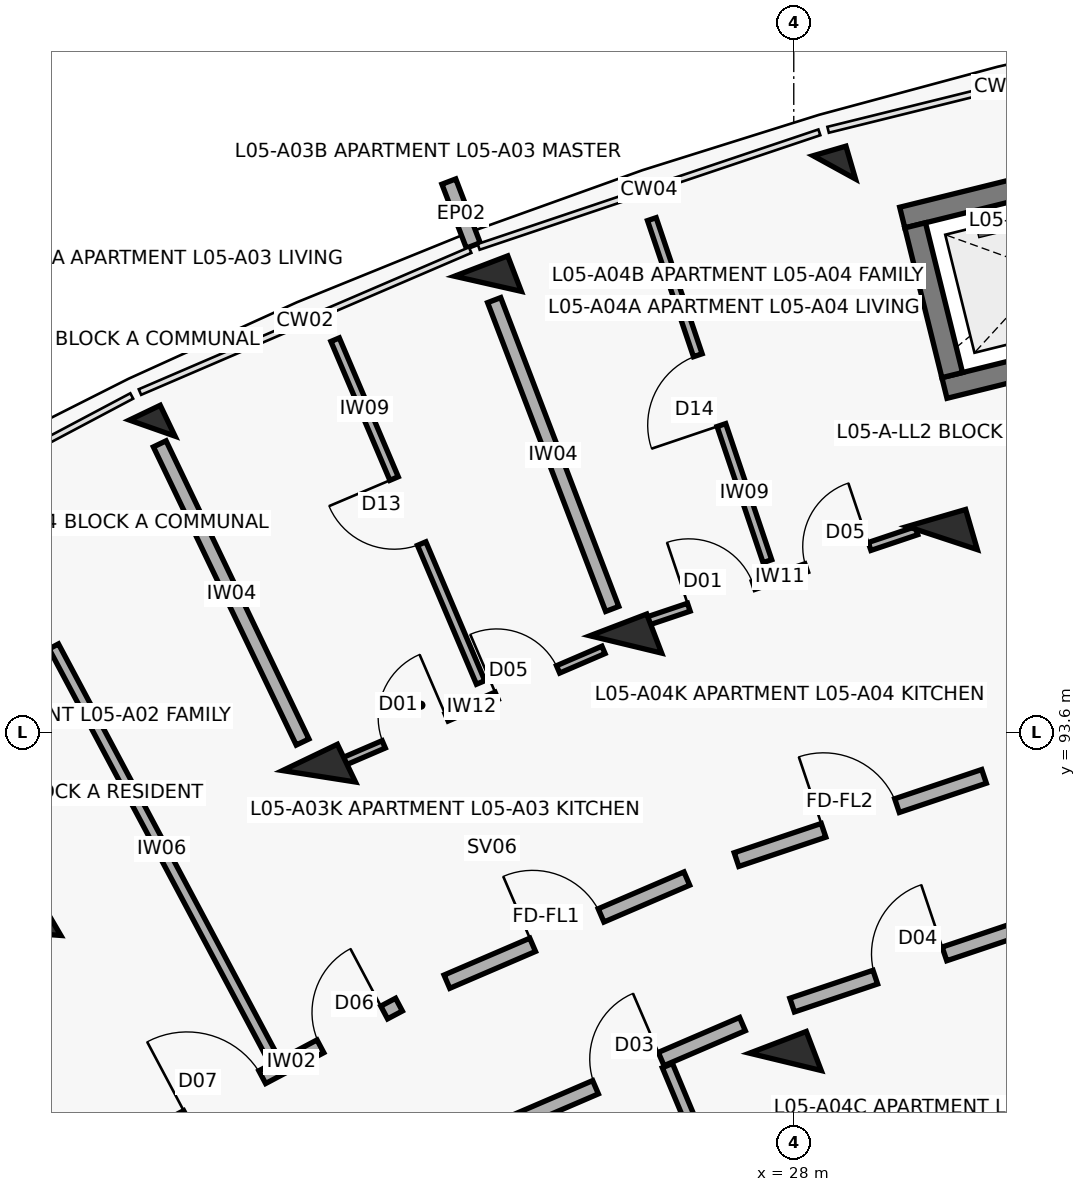
"""IFC4 building model, lengths in metres.
Left out: names, types, materials, properties, quantities, classifications, styles, units other than length and angle.
Written with IfcOpenShell. Run it as: python <this file> out.ifc"""

import sys

from ifc_helpers import new_model, si_unit, direction, frame, frame_2d, origin, origin_2d, place, context, subcontext, project, spatial, rectangle, extrude, element, fill, save


model = new_model("IFC4")
c1 = context("Model", 3, precision=1e-05, world=origin(), true_north=direction((0.0, 1.0)))
c2 = subcontext(c1, "Body", "Model", "MODEL_VIEW")
j1 = project(units=[si_unit("LENGTHUNIT", "METRE"), si_unit("PLANEANGLEUNIT", "RADIAN")], contexts=[c1])
p1 = place(None, origin())
s1 = spatial("IfcSite", under=j1, at=p1, CompositionType="ELEMENT")
p2 = place(p1, origin())
s2 = spatial("IfcBuilding", under=s1, at=p2, CompositionType="ELEMENT")
p3 = place(p2, frame((0.0, 0.0, 17.4)))
s3 = spatial("IfcBuildingStorey", under=s2, at=p3, CompositionType="ELEMENT", Elevation=17.4)
for number, where, z_axis, x_axis in (
    (1, (17.873, 90.96, 0.0), (0.0, 0.0, 1.0), (-0.504, 0.864, 0.0)),
    (2, (21.754, 93.019, 0.0), (0.0, 0.0, 1.0), (-0.432, 0.902, 0.0)),
):
    element("IfcColumn", number, at=place(p3, frame(where, z_axis=z_axis, x_axis=x_axis)), inside=s3, PredefinedType="COLUMN", context=c2, shape_type="SweptSolid", body=[
        extrude(rectangle(XDim=0.55, YDim=0.8, at=origin_2d()), origin(), (0.0, 0.0, 1.0), 3.1),
    ])
p4 = place(p3, frame((19.559, 97.6, 0.0), z_axis=(0.0, 0.0, 1.0), x_axis=(-0.432085748802, 0.901832526405, 0.0)))
e3 = element("IfcColumn", 3, at=p4, inside=s3, PredefinedType="COLUMN", context=c2, shape_type="SweptSolid", body=[
    extrude(rectangle(XDim=0.45, YDim=0.45, at=origin_2d()), origin(), (0.0, 0.0, 1.0), 3.1),
])
for number, where, z_axis, x_axis in (
    (4, (27.889, 89.261, 0.0), (0.0, 0.0, 1.0), (-0.357, 0.934, 0.0)),
    (5, (25.79, 94.753, 0.0), (0.0, 0.0, 1.0), (-0.357, 0.934, 0.0)),
):
    element("IfcColumn", number, at=place(p3, frame(where, z_axis=z_axis, x_axis=x_axis)), inside=s3, PredefinedType="COLUMN", context=c2, shape_type="SweptSolid", body=[
        extrude(rectangle(XDim=0.55, YDim=0.8, at=origin_2d()), origin(), (0.0, 0.0, 1.0), 3.1),
    ])
p5 = place(p3, frame((23.976, 99.499, 0.0), z_axis=(0.0, 0.0, 1.0), x_axis=(-0.357064076459, 0.934079892355, 0.0)))
e6 = element("IfcColumn", 6, at=p5, inside=s3, PredefinedType="COLUMN", context=c2, shape_type="SweptSolid", body=[
    extrude(rectangle(XDim=0.5, YDim=0.75, at=origin_2d()), origin(), (0.0, 0.0, 1.0), 3.1),
])
p6 = place(p3, frame((29.954, 96.153, 0.0), z_axis=(0.0, 0.0, 1.0), x_axis=(-0.27966144946, 0.96009867914, 0.0)))
e7 = element("IfcColumn", 7, at=p6, inside=s3, PredefinedType="COLUMN", context=c2, shape_type="SweptSolid", body=[
    extrude(rectangle(XDim=0.55, YDim=0.8, at=origin_2d()), origin(), (0.0, 0.0, 1.0), 3.1),
])
p7 = place(p3, frame((28.533, 101.031, 0.0), z_axis=(0.0, 0.0, 1.0), x_axis=(-0.27966144946, 0.96009867914, 0.0)))
e8 = element("IfcColumn", 8, at=p7, inside=s3, PredefinedType="COLUMN", context=c2, shape_type="SweptSolid", body=[
    extrude(rectangle(XDim=0.45, YDim=0.45, at=origin_2d()), origin(), (0.0, 0.0, 1.0), 3.1),
])
p8 = place(p3, frame((23.783, 100.003, 0.0), z_axis=(0.0, 0.0, 1.0), x_axis=(-0.356942580168, 0.934126326823, 0.0)))
e9 = element("IfcWall", 9, at=p8, inside=s3, PredefinedType="PARAPET", context=c2, shape_type="SweptSolid", body=[
    extrude(rectangle(XDim=0.9, YDim=0.195, at=frame_2d((0.45, 0.0))), origin(), (0.0, 0.0, 1.0), 2.25),
])
p9 = place(p3, frame((33.273, 98.942, 0.0), z_axis=(0.0, 0.0, 1.0), x_axis=(-0.970707542441, -0.240264160972, 0.0)))
e10 = element("IfcWall", 10, at=p9, inside=s3, PredefinedType="SHEAR", context=c2, shape_type="SweptSolid", body=[
    extrude(rectangle(XDim=3.39, YDim=0.28, at=frame_2d((1.695, 0.0))), origin(), (0.0, 0.0, 1.0), 3.1),
])
p10 = place(p9, frame((1.095, 0.0, 0.0)))
e11 = element("IfcOpeningElement", 11, at=p10, cuts=e10, PredefinedType="OPENING", context=c2, shape_type="SweptSolid", body=[
    extrude(rectangle(XDim=1.2, YDim=2.15, at=frame_2d((0.6, 1.075))), frame((0.0, 0.15, 0.0), z_axis=(0.0, -1.0, 0.0), x_axis=(1.0, 0.0, 0.0)), (0.0, 0.0, 1.0), 0.3),
])
p11 = place(p3, frame((32.718, 101.185, 0.0), z_axis=(0.0, 0.0, 1.0), x_axis=(-0.970711699588, -0.240247364777, 0.0)))
e12 = element("IfcWall", 12, at=p11, inside=s3, PredefinedType="SHEAR", context=c2, shape_type="SweptSolid", body=[
    extrude(rectangle(XDim=3.39, YDim=0.28, at=frame_2d((1.695, 0.0))), origin(), (0.0, 0.0, 1.0), 3.1),
])
p12 = place(p3, frame((30.085, 98.297, 0.0), z_axis=(0.0, 0.0, 1.0), x_axis=(-0.2402993748, 0.970698825832, 0.0)))
e13 = element("IfcWall", 13, at=p12, inside=s3, PredefinedType="SHEAR", context=c2, shape_type="SweptSolid", body=[
    extrude(rectangle(XDim=2.03, YDim=0.28, at=frame_2d((1.015, 0.0))), origin(), (0.0, 0.0, 1.0), 3.1),
])
p13 = place(p3, frame((19.77, 88.404, 0.0), z_axis=(0.0, 0.0, 1.0), x_axis=(0.883410853063, 0.468599258099, 0.0)))
e14 = element("IfcWall", 14, at=p13, inside=s3, PredefinedType="SOLIDWALL", context=c2, shape_type="SweptSolid", body=[
    extrude(rectangle(XDim=3.436, YDim=0.19, at=frame_2d((1.718, 0.0))), origin(), (0.0, 0.0, 1.0), 2.08),
])
p14 = place(p13, frame((0.28, 0.0, 0.0)))
e15 = element("IfcOpeningElement", 15, at=p14, cuts=e14, PredefinedType="OPENING", context=c2, shape_type="SweptSolid", body=[
    extrude(rectangle(XDim=1.12, YDim=2.15, at=frame_2d((0.56, 1.075))), frame((0.0, 0.105, 0.0), z_axis=(0.0, -1.0, 0.0), x_axis=(1.0, 0.0, 0.0)), (0.0, 0.0, 1.0), 0.21),
])
p15 = place(p13, frame((2.266, 0.0, 0.0)))
e16 = element("IfcOpeningElement", 16, at=p15, cuts=e14, PredefinedType="OPENING", context=c2, shape_type="SweptSolid", body=[
    extrude(rectangle(XDim=0.95, YDim=2.1, at=frame_2d((0.475, 1.05))), frame((0.0, 0.105, 0.0), z_axis=(0.0, -1.0, 0.0), x_axis=(1.0, 0.0, 0.0)), (0.0, 0.0, 1.0), 0.21),
])
p16 = place(p3, frame((21.107, 89.387, 0.0), z_axis=(0.0, 0.0, 1.0), x_axis=(-0.469891538074, 0.882724159886, 0.0)))
e17 = element("IfcWall", 17, at=p16, inside=s3, PredefinedType="PARTITIONING", context=c2, shape_type="SweptSolid", body=[
    extrude(rectangle(XDim=7.95, YDim=0.14, at=frame_2d((3.975, 0.0))), origin(), (0.0, 0.0, 1.0), 2.08),
])
p17 = place(p16, frame((6.05, 0.0, 0.0)))
e18 = element("IfcOpeningElement", 18, at=p17, cuts=e17, PredefinedType="OPENING", context=c2, shape_type="SweptSolid", body=[
    extrude(rectangle(XDim=0.92, YDim=2.1, at=frame_2d((0.46, 1.05))), frame((0.0, 0.08, 0.0), z_axis=(0.0, -1.0, 0.0), x_axis=(1.0, 0.0, 0.0)), (0.0, 0.0, 1.0), 0.16),
])
p18 = place(p3, frame((23.437, 90.316, 0.0), z_axis=(0.0, 0.0, 1.0), x_axis=(0.918718172399, 0.394913813008, 0.0)))
e19 = element("IfcWall", 19, at=p18, inside=s3, PredefinedType="SOLIDWALL", context=c2, shape_type="SweptSolid", body=[
    extrude(rectangle(XDim=3.436, YDim=0.19, at=frame_2d((1.718, 0.0))), origin(), (0.0, 0.0, 1.0), 2.08),
])
p19 = place(p18, frame((1.228, 0.0, 0.0)))
e20 = element("IfcOpeningElement", 20, at=p19, cuts=e19, PredefinedType="OPENING", context=c2, shape_type="SweptSolid", body=[
    extrude(rectangle(XDim=0.98, YDim=2.15, at=frame_2d((0.49, 1.075))), frame((0.0, 0.105, 0.0), z_axis=(0.0, -1.0, 0.0), x_axis=(1.0, 0.0, 0.0)), (0.0, 0.0, 1.0), 0.21),
])
p20 = place(p3, frame((24.322, 88.467, 0.0), z_axis=(0.0, 0.0, 1.0), x_axis=(0.918723391052, 0.394901672235, 0.0)))
e21 = element("IfcWall", 21, at=p20, inside=s3, PredefinedType="SOLIDWALL", context=c2, shape_type="SweptSolid", body=[
    extrude(rectangle(XDim=3.269, YDim=0.19, at=frame_2d((1.634, 0.0))), origin(), (0.0, 0.0, 1.0), 2.08),
])
p21 = place(p20, frame((1.164, 0.0, 0.0)))
e22 = element("IfcOpeningElement", 22, at=p21, cuts=e21, PredefinedType="OPENING", context=c2, shape_type="SweptSolid", body=[
    extrude(rectangle(XDim=0.94, YDim=2.1, at=frame_2d((0.47, 1.05))), frame((0.0, 0.105, 0.0), z_axis=(0.0, -1.0, 0.0), x_axis=(1.0, 0.0, 0.0)), (0.0, 0.0, 1.0), 0.21),
])
p22 = place(p3, frame((27.609, 86.166, 0.0), z_axis=(0.0, 0.0, 1.0), x_axis=(-0.385151143297, 0.922853507777, 0.0)))
e23 = element("IfcWall", 23, at=p22, inside=s3, PredefinedType="PARTITIONING", context=c2, shape_type="SweptSolid", body=[
    extrude(rectangle(XDim=3.3, YDim=0.145, at=frame_2d((1.65, 0.0))), origin(), (0.0, 0.0, 1.0), 2.08),
])
p23 = place(p22, frame((1.21, 0.0, 0.0)))
e24 = element("IfcOpeningElement", 24, at=p23, cuts=e23, PredefinedType="OPENING", context=c2, shape_type="SweptSolid", body=[
    extrude(rectangle(XDim=0.88, YDim=2.1, at=frame_2d((0.44, 1.05))), frame((0.0, 0.083, 0.0), z_axis=(0.0, -1.0, 0.0), x_axis=(1.0, 0.0, 0.0)), (0.0, 0.0, 1.0), 0.165),
])
p24 = place(p3, frame((22.008, 93.182, 0.0), z_axis=(0.0, 0.0, 1.0), x_axis=(0.918732171064, 0.394881245253, 0.0)))
e25 = element("IfcWall", 25, at=p24, inside=s3, PredefinedType="PARTITIONING", context=c2, shape_type="SweptSolid", body=[
    extrude(rectangle(XDim=3.797, YDim=0.105, at=frame_2d((1.899, 0.0))), origin(), (0.0, 0.0, 1.0), 2.08),
])
p25 = place(p24, frame((0.65, 0.0, 0.0)))
e26 = element("IfcOpeningElement", 26, at=p25, cuts=e25, PredefinedType="OPENING", context=c2, shape_type="SweptSolid", body=[
    extrude(rectangle(XDim=0.9, YDim=2.1, at=frame_2d((0.45, 1.05))), frame((0.0, 0.062, 0.0), z_axis=(0.0, -1.0, 0.0), x_axis=(1.0, 0.0, 0.0)), (0.0, 0.0, 1.0), 0.125),
])
p26 = place(p24, frame((2.267, 0.0, 0.0)))
e27 = element("IfcOpeningElement", 27, at=p26, cuts=e25, PredefinedType="OPENING", context=c2, shape_type="SweptSolid", body=[
    extrude(rectangle(XDim=0.88, YDim=2.1, at=frame_2d((0.44, 1.05))), frame((0.0, 0.062, 0.0), z_axis=(0.0, -1.0, 0.0), x_axis=(1.0, 0.0, 0.0)), (0.0, 0.0, 1.0), 0.125),
])
p27 = place(p3, frame((23.88, 94.253, 0.0), z_axis=(0.0, 0.0, 1.0), x_axis=(-0.39076607415, 0.920490019116, 0.0)))
e28 = element("IfcWall", 28, at=p27, inside=s3, PredefinedType="PARTITIONING", context=c2, shape_type="SweptSolid", body=[
    extrude(rectangle(XDim=4.9, YDim=0.12, at=frame_2d((2.45, 0.0))), origin(), (0.0, 0.0, 1.0), 2.08),
])
p28 = place(p27, frame((1.985, 0.0, 0.0)))
e29 = element("IfcOpeningElement", 29, at=p28, cuts=e28, PredefinedType="OPENING", context=c2, shape_type="SweptSolid", body=[
    extrude(rectangle(XDim=0.93, YDim=2.1, at=frame_2d((0.465, 1.05))), frame((0.0, 0.07, 0.0), z_axis=(0.0, -1.0, 0.0), x_axis=(1.0, 0.0, 0.0)), (0.0, 0.0, 1.0), 0.14),
])
p29 = place(p3, frame((21.538, 93.469, 0.0), z_axis=(0.0, 0.0, 1.0), x_axis=(-0.432086898897, 0.901831975371, 0.0)))
e30 = element("IfcWall", 30, at=p29, inside=s3, PredefinedType="SOLIDWALL", context=c2, shape_type="SweptSolid", body=[
    extrude(rectangle(XDim=4.35, YDim=0.185, at=frame_2d((2.175, 0.0))), origin(), (0.0, 0.0, 1.0), 2.08),
])
p30 = place(p3, frame((27.247, 91.923, 0.0), z_axis=(0.0, 0.0, 1.0), x_axis=(0.947863007629, 0.318678080151, 0.0)))
e31 = element("IfcWall", 31, at=p30, inside=s3, PredefinedType="SOLIDWALL", context=c2, shape_type="SweptSolid", body=[
    extrude(rectangle(XDim=3.436, YDim=0.19, at=frame_2d((1.718, 0.0))), origin(), (0.0, 0.0, 1.0), 2.08),
])
p31 = place(p30, frame((1.208, 0.0, 0.0)))
e32 = element("IfcOpeningElement", 32, at=p31, cuts=e31, PredefinedType="OPENING", context=c2, shape_type="SweptSolid", body=[
    extrude(rectangle(XDim=1.02, YDim=2.15, at=frame_2d((0.51, 1.075))), frame((0.0, 0.105, 0.0), z_axis=(0.0, -1.0, 0.0), x_axis=(1.0, 0.0, 0.0)), (0.0, 0.0, 1.0), 0.21),
])
p32 = place(p3, frame((27.979, 90.008, 0.0), z_axis=(0.0, 0.0, 1.0), x_axis=(0.94787351033, 0.318646839643, 0.0)))
e33 = element("IfcWall", 33, at=p32, inside=s3, PredefinedType="SOLIDWALL", context=c2, shape_type="SweptSolid", body=[
    extrude(rectangle(XDim=3.269, YDim=0.19, at=frame_2d((1.634, 0.0))), origin(), (0.0, 0.0, 1.0), 2.08),
])
p33 = place(p32, frame((1.154, 0.0, 0.0)))
e34 = element("IfcOpeningElement", 34, at=p33, cuts=e33, PredefinedType="OPENING", context=c2, shape_type="SweptSolid", body=[
    extrude(rectangle(XDim=0.96, YDim=2.1, at=frame_2d((0.48, 1.05))), frame((0.0, 0.105, 0.0), z_axis=(0.0, -1.0, 0.0), x_axis=(1.0, 0.0, 0.0)), (0.0, 0.0, 1.0), 0.21),
])
p34 = place(p3, frame((26.003, 95.036, 0.0), z_axis=(0.0, 0.0, 1.0), x_axis=(0.947879193428, 0.318629933725, 0.0)))
e35 = element("IfcWall", 35, at=p34, inside=s3, PredefinedType="PARTITIONING", context=c2, shape_type="SweptSolid", body=[
    extrude(rectangle(XDim=3.81, YDim=0.11, at=frame_2d((1.905, 0.0))), origin(), (0.0, 0.0, 1.0), 2.08),
])
p35 = place(p34, frame((0.65, 0.0, 0.0)))
e36 = element("IfcOpeningElement", 36, at=p35, cuts=e35, PredefinedType="OPENING", context=c2, shape_type="SweptSolid", body=[
    extrude(rectangle(XDim=0.9, YDim=2.1, at=frame_2d((0.45, 1.05))), frame((0.0, 0.065, 0.0), z_axis=(0.0, -1.0, 0.0), x_axis=(1.0, 0.0, 0.0)), (0.0, 0.0, 1.0), 0.13),
])
p36 = place(p34, frame((2.28, 0.0, 0.0)))
e37 = element("IfcOpeningElement", 37, at=p36, cuts=e35, PredefinedType="OPENING", context=c2, shape_type="SweptSolid", body=[
    extrude(rectangle(XDim=0.88, YDim=2.1, at=frame_2d((0.44, 1.05))), frame((0.0, 0.065, 0.0), z_axis=(0.0, -1.0, 0.0), x_axis=(1.0, 0.0, 0.0)), (0.0, 0.0, 1.0), 0.13),
])
p37 = place(p3, frame((27.653, 95.849, 0.0), z_axis=(0.0, 0.0, 1.0), x_axis=(-0.320049134076, 0.947400945628, 0.0)))
e38 = element("IfcWall", 38, at=p37, inside=s3, PredefinedType="PARTITIONING", context=c2, shape_type="SweptSolid", body=[
    extrude(rectangle(XDim=4.75, YDim=0.12, at=frame_2d((2.375, 0.0))), origin(), (0.0, 0.0, 1.0), 2.08),
])
p38 = place(p37, frame((1.89, 0.0, 0.0)))
e39 = element("IfcOpeningElement", 39, at=p38, cuts=e38, PredefinedType="OPENING", context=c2, shape_type="SweptSolid", body=[
    extrude(rectangle(XDim=0.97, YDim=2.1, at=frame_2d((0.485, 1.05))), frame((0.0, 0.07, 0.0), z_axis=(0.0, -1.0, 0.0), x_axis=(1.0, 0.0, 0.0)), (0.0, 0.0, 1.0), 0.14),
])
p39 = place(p3, frame((25.611, 95.22, 0.0), z_axis=(0.0, 0.0, 1.0), x_axis=(-0.357064016205, 0.934079915388, 0.0)))
e40 = element("IfcWall", 40, at=p39, inside=s3, PredefinedType="SOLIDWALL", context=c2, shape_type="SweptSolid", body=[
    extrude(rectangle(XDim=4.35, YDim=0.185, at=frame_2d((2.175, 0.0))), origin(), (0.0, 0.0, 1.0), 2.08),
])
p40 = place(p14, origin())
e41 = element("IfcDoor", 41, at=p40, inside=s3, OperationType="SINGLE_SWING_LEFT", PredefinedType="DOOR", context=c2, shape_type="SweptSolid", body=[
    extrude(rectangle(XDim=1.12, YDim=2.15, at=frame_2d((0.56, 1.075))), frame((0.0, 0.025, 0.0), z_axis=(0.0, -1.0, 0.0), x_axis=(1.0, 0.0, 0.0)), (0.0, 0.0, 1.0), 0.05),
])
fill(e15, e41)
p41 = place(p15, origin())
e42 = element("IfcDoor", 42, at=p41, inside=s3, OperationType="SINGLE_SWING_RIGHT", PredefinedType="DOOR", context=c2, shape_type="SweptSolid", body=[
    extrude(rectangle(XDim=0.95, YDim=2.1, at=frame_2d((0.475, 1.05))), frame((0.0, 0.025, 0.0), z_axis=(0.0, -1.0, 0.0), x_axis=(1.0, 0.0, 0.0)), (0.0, 0.0, 1.0), 0.05),
])
fill(e16, e42)
p42 = place(p17, origin())
e43 = element("IfcDoor", 43, at=p42, inside=s3, OperationType="SINGLE_SWING_RIGHT", PredefinedType="DOOR", context=c2, shape_type="SweptSolid", body=[
    extrude(rectangle(XDim=0.92, YDim=2.1, at=frame_2d((0.46, 1.05))), frame((0.0, 0.025, 0.0), z_axis=(0.0, -1.0, 0.0), x_axis=(1.0, 0.0, 0.0)), (0.0, 0.0, 1.0), 0.05),
])
fill(e18, e43)
p43 = place(p19, origin())
e44 = element("IfcDoor", 44, at=p43, inside=s3, OperationType="SINGLE_SWING_LEFT", PredefinedType="DOOR", context=c2, shape_type="SweptSolid", body=[
    extrude(rectangle(XDim=0.98, YDim=2.15, at=frame_2d((0.49, 1.075))), frame((0.0, 0.025, 0.0), z_axis=(0.0, -1.0, 0.0), x_axis=(1.0, 0.0, 0.0)), (0.0, 0.0, 1.0), 0.05),
])
fill(e20, e44)
p44 = place(p21, origin())
e45 = element("IfcDoor", 45, at=p44, inside=s3, OperationType="SINGLE_SWING_RIGHT", PredefinedType="DOOR", context=c2, shape_type="SweptSolid", body=[
    extrude(rectangle(XDim=0.94, YDim=2.1, at=frame_2d((0.47, 1.05))), frame((0.0, 0.025, 0.0), z_axis=(0.0, -1.0, 0.0), x_axis=(1.0, 0.0, 0.0)), (0.0, 0.0, 1.0), 0.05),
])
fill(e22, e45)
p45 = place(p25, origin())
e46 = element("IfcDoor", 46, at=p45, inside=s3, OperationType="SINGLE_SWING_RIGHT", PredefinedType="DOOR", context=c2, shape_type="SweptSolid", body=[
    extrude(rectangle(XDim=0.9, YDim=2.1, at=frame_2d((0.45, 1.05))), frame((0.0, 0.025, 0.0), z_axis=(0.0, -1.0, 0.0), x_axis=(1.0, 0.0, 0.0)), (0.0, 0.0, 1.0), 0.05),
])
fill(e26, e46)
p46 = place(p26, origin())
e47 = element("IfcDoor", 47, at=p46, inside=s3, OperationType="SINGLE_SWING_LEFT", PredefinedType="DOOR", context=c2, shape_type="SweptSolid", body=[
    extrude(rectangle(XDim=0.88, YDim=2.1, at=frame_2d((0.44, 1.05))), frame((0.0, 0.025, 0.0), z_axis=(0.0, -1.0, 0.0), x_axis=(1.0, 0.0, 0.0)), (0.0, 0.0, 1.0), 0.05),
])
fill(e27, e47)
p47 = place(p28, origin())
e48 = element("IfcDoor", 48, at=p47, inside=s3, OperationType="SINGLE_SWING_RIGHT", PredefinedType="DOOR", context=c2, shape_type="SweptSolid", body=[
    extrude(rectangle(XDim=0.93, YDim=2.1, at=frame_2d((0.465, 1.05))), frame((0.0, 0.025, 0.0), z_axis=(0.0, -1.0, 0.0), x_axis=(1.0, 0.0, 0.0)), (0.0, 0.0, 1.0), 0.05),
])
fill(e29, e48)
p48 = place(p31, origin())
e49 = element("IfcDoor", 49, at=p48, inside=s3, OperationType="SINGLE_SWING_LEFT", PredefinedType="DOOR", context=c2, shape_type="SweptSolid", body=[
    extrude(rectangle(XDim=1.02, YDim=2.15, at=frame_2d((0.51, 1.075))), frame((0.0, 0.025, 0.0), z_axis=(0.0, -1.0, 0.0), x_axis=(1.0, 0.0, 0.0)), (0.0, 0.0, 1.0), 0.05),
])
fill(e32, e49)
p49 = place(p33, origin())
e50 = element("IfcDoor", 50, at=p49, inside=s3, OperationType="SINGLE_SWING_RIGHT", PredefinedType="DOOR", context=c2, shape_type="SweptSolid", body=[
    extrude(rectangle(XDim=0.96, YDim=2.1, at=frame_2d((0.48, 1.05))), frame((0.0, 0.025, 0.0), z_axis=(0.0, -1.0, 0.0), x_axis=(1.0, 0.0, 0.0)), (0.0, 0.0, 1.0), 0.05),
])
fill(e34, e50)
p50 = place(p35, origin())
e51 = element("IfcDoor", 51, at=p50, inside=s3, OperationType="SINGLE_SWING_LEFT", PredefinedType="DOOR", context=c2, shape_type="SweptSolid", body=[
    extrude(rectangle(XDim=0.9, YDim=2.1, at=frame_2d((0.45, 1.05))), frame((0.0, 0.025, 0.0), z_axis=(0.0, -1.0, 0.0), x_axis=(1.0, 0.0, 0.0)), (0.0, 0.0, 1.0), 0.05),
])
fill(e36, e51)
p51 = place(p36, origin())
e52 = element("IfcDoor", 52, at=p51, inside=s3, OperationType="SINGLE_SWING_RIGHT", PredefinedType="DOOR", context=c2, shape_type="SweptSolid", body=[
    extrude(rectangle(XDim=0.88, YDim=2.1, at=frame_2d((0.44, 1.05))), frame((0.0, 0.025, 0.0), z_axis=(0.0, -1.0, 0.0), x_axis=(1.0, 0.0, 0.0)), (0.0, 0.0, 1.0), 0.05),
])
fill(e37, e52)
p52 = place(p38, origin())
e53 = element("IfcDoor", 53, at=p52, inside=s3, OperationType="SINGLE_SWING_LEFT", PredefinedType="DOOR", context=c2, shape_type="SweptSolid", body=[
    extrude(rectangle(XDim=0.97, YDim=2.1, at=frame_2d((0.485, 1.05))), frame((0.0, 0.025, 0.0), z_axis=(0.0, -1.0, 0.0), x_axis=(1.0, 0.0, 0.0)), (0.0, 0.0, 1.0), 0.05),
])
fill(e39, e53)
save(model, sys.argv[1])
